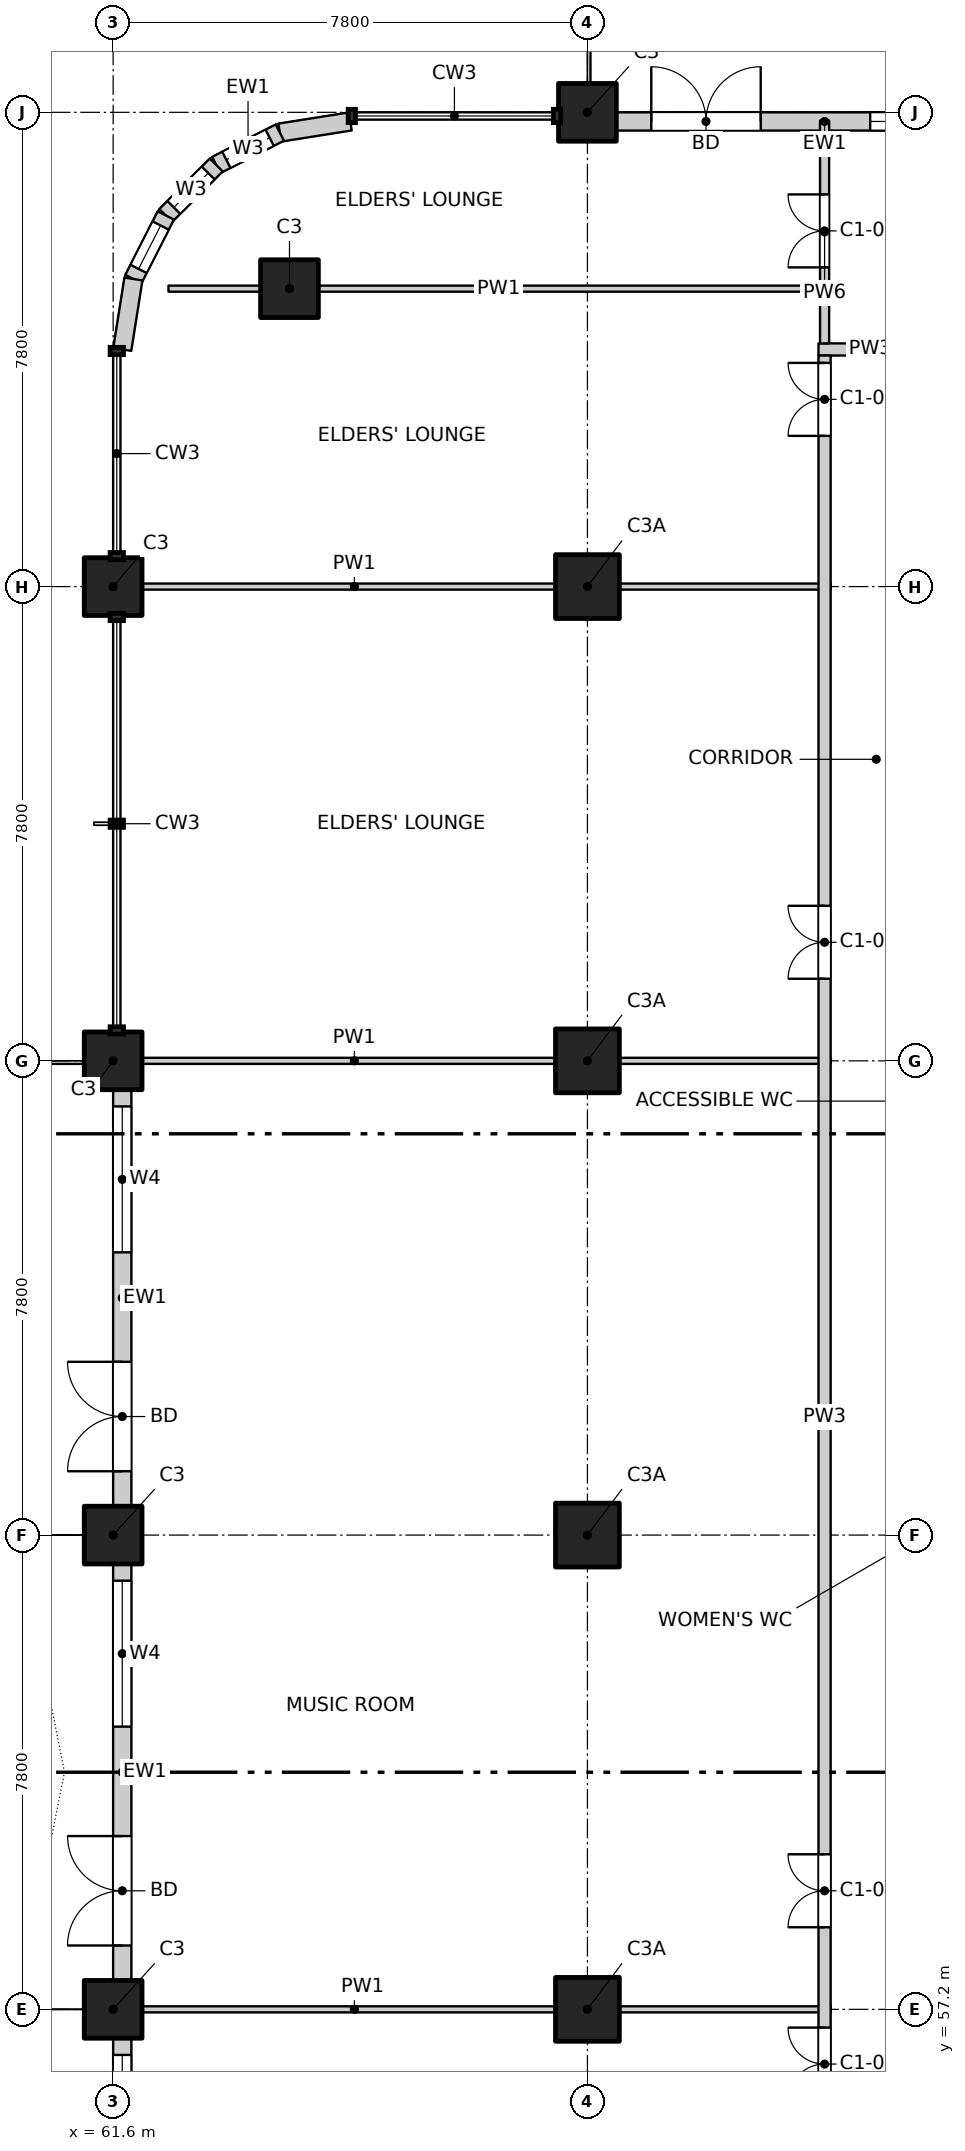
"""IFC4 building model, lengths in metres.
Left out: names, types, materials, properties, quantities, classifications, styles, units other than length and angle.
Written with IfcOpenShell. Run it as: python <this file> out.ifc"""

import sys

from ifc_helpers import new_model, si_unit, direction, frame, frame_2d, origin, origin_2d, place, context, subcontext, project, spatial, rectangle, extrude, element, fill, save


model = new_model("IFC4")
c1 = context("Model", 3, precision=1e-05, world=origin(), true_north=direction((0.0, 1.0)))
c2 = subcontext(c1, "Body", "Model", "MODEL_VIEW")
j1 = project(units=[si_unit("LENGTHUNIT", "METRE"), si_unit("PLANEANGLEUNIT", "RADIAN")], contexts=[c1])
p1 = place(None, origin())
s1 = spatial("IfcSite", under=j1, at=p1, CompositionType="ELEMENT")
p2 = place(p1, origin())
s2 = spatial("IfcBuilding", under=s1, at=p2, CompositionType="ELEMENT")
p3 = place(p2, frame((0.0, 0.0, 71.6)))
s3 = spatial("IfcBuildingStorey", under=s2, at=p3, CompositionType="ELEMENT", Elevation=71.6)
for number, where, z_axis, x_axis in (
    (1, (64.5, 85.5, -0.25), (0.0, 0.0, 1.0), (1.0, 0.0, 0.0)),
    (2, (69.4, 88.4, -0.25), (0.0, 0.0, 1.0), (1.0, 0.0, 0.0)),
    (3, (61.6, 57.2, -0.25), (0.0, 0.0, 1.0), (1.0, 0.0, 0.0)),
    (4, (61.6, 65.0, -0.25), (0.0, 0.0, 1.0), (1.0, 0.0, 0.0)),
    (5, (61.6, 72.8, -0.25), (0.0, 0.0, 1.0), (1.0, 0.0, 0.0)),
    (6, (61.6, 80.6, -0.25), (0.0, 0.0, 1.0), (1.0, 0.0, 0.0)),
):
    element("IfcColumn", number, at=place(p3, frame(where, z_axis=z_axis, x_axis=x_axis)), inside=s3, PredefinedType="COLUMN", context=c2, shape_type="SweptSolid", body=[
        extrude(rectangle(XDim=0.95, YDim=0.95, at=origin_2d()), origin(), (0.0, 0.0, 1.0), 3.4),
    ])
for number, where, z_axis, x_axis in (
    (7, (69.4, 57.2, -0.25), (0.0, 0.0, 1.0), (1.0, 0.0, 0.0)),
    (8, (69.4, 65.0, -0.25), (0.0, 0.0, 1.0), (1.0, 0.0, 0.0)),
    (9, (69.4, 72.8, -0.25), (0.0, 0.0, 1.0), (1.0, 0.0, 0.0)),
    (10, (69.4, 80.6, -0.25), (0.0, 0.0, 1.0), (1.0, 0.0, 0.0)),
):
    element("IfcColumn", number, at=place(p3, frame(where, z_axis=z_axis, x_axis=x_axis)), inside=s3, PredefinedType="COLUMN", context=c2, shape_type="SweptSolid", body=[
        extrude(rectangle(XDim=1.05, YDim=1.05, at=origin_2d()), origin(), (0.0, 0.0, 1.0), 3.4),
    ])
p4 = place(p3, frame((69.875, 88.25, 0.0), z_axis=(0.0, 0.0, 1.0), x_axis=(1.0, 0.0, 0.0)))
e11 = element("IfcWall", 11, at=p4, inside=s3, PredefinedType="SOLIDWALL", context=c2, shape_type="SweptSolid", body=[
    extrude(rectangle(XDim=6.85, YDim=0.3, at=frame_2d((3.425, 0.0))), origin(), (0.0, 0.0, 1.0), 2.7),
])
p5 = place(p4, frame((0.575, 0.0, 0.0)))
e12 = element("IfcOpeningElement", 12, at=p5, cuts=e11, PredefinedType="OPENING", context=c2, shape_type="SweptSolid", body=[
    extrude(rectangle(XDim=1.8, YDim=2.4, at=frame_2d((0.9, 1.2))), frame((0.0, 0.16, 0.0), z_axis=(0.0, -1.0, 0.0), x_axis=(1.0, 0.0, 0.0)), (0.0, 0.0, 1.0), 0.32),
])
p6 = place(p4, frame((4.175, 0.0, 0.6)))
e13 = element("IfcOpeningElement", 13, at=p6, cuts=e11, PredefinedType="OPENING", context=c2, shape_type="SweptSolid", body=[
    extrude(rectangle(XDim=2.4, YDim=2.1, at=frame_2d((1.2, 1.05))), frame((0.0, 0.16, 0.0), z_axis=(0.0, -1.0, 0.0), x_axis=(1.0, 0.0, 0.0)), (0.0, 0.0, 1.0), 0.32),
])
p7 = place(p3, frame((61.75, 49.875, 0.0), z_axis=(0.0, 0.0, 1.0), x_axis=(0.0, 1.0, 0.0)))
e14 = element("IfcWall", 14, at=p7, inside=s3, PredefinedType="SOLIDWALL", context=c2, shape_type="SweptSolid", body=[
    extrude(rectangle(XDim=6.85, YDim=0.3, at=frame_2d((3.425, 0.0))), origin(), (0.0, 0.0, 1.0), 2.7),
])
p8 = place(p7, frame((0.575, 0.0, 0.0)))
e15 = element("IfcOpeningElement", 15, at=p8, cuts=e14, PredefinedType="OPENING", context=c2, shape_type="SweptSolid", body=[
    extrude(rectangle(XDim=1.8, YDim=2.4, at=frame_2d((0.9, 1.2))), frame((0.0, 0.16, 0.0), z_axis=(0.0, -1.0, 0.0), x_axis=(1.0, 0.0, 0.0)), (0.0, 0.0, 1.0), 0.32),
])
p9 = place(p7, frame((4.175, 0.0, 0.6)))
e16 = element("IfcOpeningElement", 16, at=p9, cuts=e14, PredefinedType="OPENING", context=c2, shape_type="SweptSolid", body=[
    extrude(rectangle(XDim=2.4, YDim=2.1, at=frame_2d((1.2, 1.05))), frame((0.0, 0.16, 0.0), z_axis=(0.0, -1.0, 0.0), x_axis=(1.0, 0.0, 0.0)), (0.0, 0.0, 1.0), 0.32),
])
p10 = place(p3, frame((61.75, 57.675, 0.0), z_axis=(0.0, 0.0, 1.0), x_axis=(0.0, 1.0, 0.0)))
e17 = element("IfcWall", 17, at=p10, inside=s3, PredefinedType="SOLIDWALL", context=c2, shape_type="SweptSolid", body=[
    extrude(rectangle(XDim=6.85, YDim=0.3, at=frame_2d((3.425, 0.0))), origin(), (0.0, 0.0, 1.0), 2.7),
])
p11 = place(p10, frame((0.575, 0.0, 0.0)))
e18 = element("IfcOpeningElement", 18, at=p11, cuts=e17, PredefinedType="OPENING", context=c2, shape_type="SweptSolid", body=[
    extrude(rectangle(XDim=1.8, YDim=2.4, at=frame_2d((0.9, 1.2))), frame((0.0, 0.16, 0.0), z_axis=(0.0, -1.0, 0.0), x_axis=(1.0, 0.0, 0.0)), (0.0, 0.0, 1.0), 0.32),
])
p12 = place(p10, frame((4.175, 0.0, 0.6)))
e19 = element("IfcOpeningElement", 19, at=p12, cuts=e17, PredefinedType="OPENING", context=c2, shape_type="SweptSolid", body=[
    extrude(rectangle(XDim=2.4, YDim=2.1, at=frame_2d((1.2, 1.05))), frame((0.0, 0.16, 0.0), z_axis=(0.0, -1.0, 0.0), x_axis=(1.0, 0.0, 0.0)), (0.0, 0.0, 1.0), 0.32),
])
p13 = place(p3, frame((61.75, 65.475, 0.0), z_axis=(0.0, 0.0, 1.0), x_axis=(0.0, 1.0, 0.0)))
e20 = element("IfcWall", 20, at=p13, inside=s3, PredefinedType="SOLIDWALL", context=c2, shape_type="SweptSolid", body=[
    extrude(rectangle(XDim=6.85, YDim=0.3, at=frame_2d((3.425, 0.0))), origin(), (0.0, 0.0, 1.0), 2.7),
])
p14 = place(p13, frame((0.575, 0.0, 0.0)))
e21 = element("IfcOpeningElement", 21, at=p14, cuts=e20, PredefinedType="OPENING", context=c2, shape_type="SweptSolid", body=[
    extrude(rectangle(XDim=1.8, YDim=2.4, at=frame_2d((0.9, 1.2))), frame((0.0, 0.16, 0.0), z_axis=(0.0, -1.0, 0.0), x_axis=(1.0, 0.0, 0.0)), (0.0, 0.0, 1.0), 0.32),
])
p15 = place(p13, frame((4.175, 0.0, 0.6)))
e22 = element("IfcOpeningElement", 22, at=p15, cuts=e20, PredefinedType="OPENING", context=c2, shape_type="SweptSolid", body=[
    extrude(rectangle(XDim=2.4, YDim=2.1, at=frame_2d((1.2, 1.05))), frame((0.0, 0.16, 0.0), z_axis=(0.0, -1.0, 0.0), x_axis=(1.0, 0.0, 0.0)), (0.0, 0.0, 1.0), 0.32),
])
p16 = place(p3, frame((65.5, 88.25, 0.0), z_axis=(0.0, 0.0, 1.0), x_axis=(-0.987678452879, -0.156496880861, 0.0)))
e23 = element("IfcWall", 23, at=p16, inside=s3, PredefinedType="SOLIDWALL", context=c2, shape_type="SweptSolid", body=[
    extrude(rectangle(XDim=1.173, YDim=0.3, at=frame_2d((0.586, 0.0))), origin(), (0.0, 0.0, 1.0), 2.7),
])
p17 = place(p3, frame((64.341, 88.066, 0.0), z_axis=(0.0, 0.0, 1.0), x_axis=(-0.890988677504, -0.454025524128, 0.0)))
e24 = element("IfcWall", 24, at=p17, inside=s3, PredefinedType="SOLIDWALL", context=c2, shape_type="SweptSolid", body=[
    extrude(rectangle(XDim=1.173, YDim=0.3, at=frame_2d((0.587, 0.0))), origin(), (0.0, 0.0, 1.0), 2.7),
])
p18 = place(p17, frame((0.187, 0.0, 0.9)))
e25 = element("IfcOpeningElement", 25, at=p18, cuts=e24, PredefinedType="OPENING", context=c2, shape_type="SweptSolid", body=[
    extrude(rectangle(XDim=0.8, YDim=1.2, at=frame_2d((0.4, 0.6))), frame((0.0, 0.16, 0.0), z_axis=(0.0, -1.0, 0.0), x_axis=(1.0, 0.0, 0.0)), (0.0, 0.0, 1.0), 0.32),
])
p19 = place(p3, frame((63.296, 87.534, 0.0), z_axis=(0.0, 0.0, 1.0), x_axis=(-0.707106781187, -0.707106781187, 0.0)))
e26 = element("IfcWall", 26, at=p19, inside=s3, PredefinedType="SOLIDWALL", context=c2, shape_type="SweptSolid", body=[
    extrude(rectangle(XDim=1.173, YDim=0.3, at=frame_2d((0.586, 0.0))), origin(), (0.0, 0.0, 1.0), 2.7),
])
p20 = place(p19, frame((0.187, 0.0, 0.9)))
e27 = element("IfcOpeningElement", 27, at=p20, cuts=e26, PredefinedType="OPENING", context=c2, shape_type="SweptSolid", body=[
    extrude(rectangle(XDim=0.8, YDim=1.2, at=frame_2d((0.4, 0.6))), frame((0.0, 0.16, 0.0), z_axis=(0.0, -1.0, 0.0), x_axis=(1.0, 0.0, 0.0)), (0.0, 0.0, 1.0), 0.32),
])
p21 = place(p3, frame((62.466, 86.704, 0.0), z_axis=(0.0, 0.0, 1.0), x_axis=(-0.454025524128, -0.890988677504, 0.0)))
e28 = element("IfcWall", 28, at=p21, inside=s3, PredefinedType="SOLIDWALL", context=c2, shape_type="SweptSolid", body=[
    extrude(rectangle(XDim=1.173, YDim=0.3, at=frame_2d((0.587, 0.0))), origin(), (0.0, 0.0, 1.0), 2.7),
])
p22 = place(p21, frame((0.187, 0.0, 0.9)))
e29 = element("IfcOpeningElement", 29, at=p22, cuts=e28, PredefinedType="OPENING", context=c2, shape_type="SweptSolid", body=[
    extrude(rectangle(XDim=0.8, YDim=1.2, at=frame_2d((0.4, 0.6))), frame((0.0, 0.16, 0.0), z_axis=(0.0, -1.0, 0.0), x_axis=(1.0, 0.0, 0.0)), (0.0, 0.0, 1.0), 0.32),
])
p23 = place(p3, frame((61.934, 85.659, 0.0), z_axis=(0.0, 0.0, 1.0), x_axis=(-0.156496880861, -0.987678452879, 0.0)))
e30 = element("IfcWall", 30, at=p23, inside=s3, PredefinedType="SOLIDWALL", context=c2, shape_type="SweptSolid", body=[
    extrude(rectangle(XDim=1.173, YDim=0.3, at=frame_2d((0.586, 0.0))), origin(), (0.0, 0.0, 1.0), 2.7),
])
p24 = place(p3, frame((61.735, 57.2, 0.0), z_axis=(0.0, 0.0, 1.0), x_axis=(1.0, 0.0, 0.0)))
e31 = element("IfcWall", 31, at=p24, inside=s3, PredefinedType="PARTITIONING", context=c2, shape_type="SweptSolid", body=[
    extrude(rectangle(XDim=7.665, YDim=0.1, at=frame_2d((3.833, 0.0))), origin(), (0.0, 0.0, 1.0), 2.55),
])
p25 = place(p3, frame((69.4, 57.2, 0.0), z_axis=(0.0, 0.0, 1.0), x_axis=(1.0, 0.0, 0.0)))
e32 = element("IfcWall", 32, at=p25, inside=s3, PredefinedType="PARTITIONING", context=c2, shape_type="SweptSolid", body=[
    extrude(rectangle(XDim=4.0, YDim=0.1, at=frame_2d((2.0, 0.0))), origin(), (0.0, 0.0, 1.0), 3.15),
])
p26 = place(p3, frame((61.735, 72.8, 0.0), z_axis=(0.0, 0.0, 1.0), x_axis=(1.0, 0.0, 0.0)))
e33 = element("IfcWall", 33, at=p26, inside=s3, PredefinedType="PARTITIONING", context=c2, shape_type="SweptSolid", body=[
    extrude(rectangle(XDim=7.665, YDim=0.1, at=frame_2d((3.833, 0.0))), origin(), (0.0, 0.0, 1.0), 2.55),
])
p27 = place(p3, frame((69.4, 72.8, 0.0), z_axis=(0.0, 0.0, 1.0), x_axis=(1.0, 0.0, 0.0)))
e34 = element("IfcWall", 34, at=p27, inside=s3, PredefinedType="PARTITIONING", context=c2, shape_type="SweptSolid", body=[
    extrude(rectangle(XDim=4.0, YDim=0.1, at=frame_2d((2.0, 0.0))), origin(), (0.0, 0.0, 1.0), 3.15),
])
p28 = place(p3, frame((61.735, 80.6, 0.0), z_axis=(0.0, 0.0, 1.0), x_axis=(1.0, 0.0, 0.0)))
e35 = element("IfcWall", 35, at=p28, inside=s3, PredefinedType="PARTITIONING", context=c2, shape_type="SweptSolid", body=[
    extrude(rectangle(XDim=7.665, YDim=0.1, at=frame_2d((3.833, 0.0))), origin(), (0.0, 0.0, 1.0), 2.55),
])
p29 = place(p3, frame((69.4, 80.6, 0.0), z_axis=(0.0, 0.0, 1.0), x_axis=(1.0, 0.0, 0.0)))
e36 = element("IfcWall", 36, at=p29, inside=s3, PredefinedType="PARTITIONING", context=c2, shape_type="SweptSolid", body=[
    extrude(rectangle(XDim=4.0, YDim=0.1, at=frame_2d((2.0, 0.0))), origin(), (0.0, 0.0, 1.0), 3.15),
])
p30 = place(p3, frame((73.2, 84.5, 0.0), z_axis=(0.0, 0.0, 1.0), x_axis=(1.0, 0.0, 0.0)))
e37 = element("IfcWall", 37, at=p30, inside=s3, PredefinedType="PARTITIONING", context=c2, shape_type="SweptSolid", body=[
    extrude(rectangle(XDim=1.7, YDim=0.2, at=frame_2d((0.85, 0.0))), origin(), (0.0, 0.0, 1.0), 3.15),
])
p31 = place(p3, frame((62.51, 85.5, 0.0), z_axis=(0.0, 0.0, 1.0), x_axis=(1.0, 0.0, 0.0)))
e38 = element("IfcWall", 38, at=p31, inside=s3, PredefinedType="PARTITIONING", context=c2, shape_type="SweptSolid", body=[
    extrude(rectangle(XDim=10.865, YDim=0.1, at=frame_2d((5.433, 0.0))), origin(), (0.0, 0.0, 1.0), 3.15),
])
p32 = place(p3, frame((73.3, 49.5, 0.0), z_axis=(0.0, 0.0, 1.0), x_axis=(0.0, 1.0, 0.0)))
e39 = element("IfcWall", 39, at=p32, inside=s3, PredefinedType="PARTITIONING", context=c2, shape_type="SweptSolid", body=[
    extrude(rectangle(XDim=34.9, YDim=0.2, at=frame_2d((17.45, 0.0))), origin(), (0.0, 0.0, 1.0), 3.15),
])
p33 = place(p32, frame((6.2, 0.0, 0.0)))
e40 = element("IfcOpeningElement", 40, at=p33, cuts=e39, PredefinedType="OPENING", context=c2, shape_type="SweptSolid", body=[
    extrude(rectangle(XDim=1.2, YDim=2.1, at=frame_2d((0.6, 1.05))), frame((0.0, 0.11, 0.0), z_axis=(0.0, -1.0, 0.0), x_axis=(1.0, 0.0, 0.0)), (0.0, 0.0, 1.0), 0.22),
])
p34 = place(p32, frame((9.05, 0.0, 0.0)))
e41 = element("IfcOpeningElement", 41, at=p34, cuts=e39, PredefinedType="OPENING", context=c2, shape_type="SweptSolid", body=[
    extrude(rectangle(XDim=1.2, YDim=2.1, at=frame_2d((0.6, 1.05))), frame((0.0, 0.11, 0.0), z_axis=(0.0, -1.0, 0.0), x_axis=(1.0, 0.0, 0.0)), (0.0, 0.0, 1.0), 0.22),
])
p35 = place(p32, frame((24.65, 0.0, 0.0)))
e42 = element("IfcOpeningElement", 42, at=p35, cuts=e39, PredefinedType="OPENING", context=c2, shape_type="SweptSolid", body=[
    extrude(rectangle(XDim=1.2, YDim=2.1, at=frame_2d((0.6, 1.05))), frame((0.0, 0.11, 0.0), z_axis=(0.0, -1.0, 0.0), x_axis=(1.0, 0.0, 0.0)), (0.0, 0.0, 1.0), 0.22),
])
p36 = place(p32, frame((33.579, 0.0, 0.0)))
e43 = element("IfcOpeningElement", 43, at=p36, cuts=e39, PredefinedType="OPENING", context=c2, shape_type="SweptSolid", body=[
    extrude(rectangle(XDim=1.2, YDim=2.1, at=frame_2d((0.6, 1.05))), frame((0.0, 0.11, 0.0), z_axis=(0.0, -1.0, 0.0), x_axis=(1.0, 0.0, 0.0)), (0.0, 0.0, 1.0), 0.22),
])
p37 = place(p3, frame((73.3, 84.6, 0.0), z_axis=(0.0, 0.0, 1.0), x_axis=(0.0, 1.0, 0.0)))
e44 = element("IfcWall", 44, at=p37, inside=s3, PredefinedType="PARTITIONING", context=c2, shape_type="SweptSolid", body=[
    extrude(rectangle(XDim=3.665, YDim=0.15, at=frame_2d((1.833, 0.0))), origin(), (0.0, 0.0, 1.0), 3.15),
])
p38 = place(p37, frame((1.25, 0.0, 0.0)))
e45 = element("IfcOpeningElement", 45, at=p38, cuts=e44, PredefinedType="OPENING", context=c2, shape_type="SweptSolid", body=[
    extrude(rectangle(XDim=1.2, YDim=2.1, at=frame_2d((0.6, 1.05))), frame((0.0, 0.085, 0.0), z_axis=(0.0, -1.0, 0.0), x_axis=(1.0, 0.0, 0.0)), (0.0, 0.0, 1.0), 0.17),
])
p39 = place(p5, origin())
e46 = element("IfcDoor", 46, at=p39, inside=s3, OperationType="DOUBLE_DOOR_SINGLE_SWING", PredefinedType="DOOR", context=c2, shape_type="SweptSolid", body=[
    extrude(rectangle(XDim=1.8, YDim=2.4, at=frame_2d((0.9, 1.2))), frame((0.0, 0.025, 0.0), z_axis=(0.0, -1.0, 0.0), x_axis=(1.0, 0.0, 0.0)), (0.0, 0.0, 1.0), 0.05),
])
fill(e12, e46)
p40 = place(p6, origin())
e47 = element("IfcWindow", 47, at=p40, inside=s3, PartitioningType="SINGLE_PANEL", PredefinedType="WINDOW", context=c2, shape_type="SweptSolid", body=[
    extrude(rectangle(XDim=2.4, YDim=2.1, at=frame_2d((1.2, 1.05))), frame((0.0, 0.03, 0.0), z_axis=(0.0, -1.0, 0.0), x_axis=(1.0, 0.0, 0.0)), (0.0, 0.0, 1.0), 0.06),
])
fill(e13, e47)
p41 = place(p9, origin())
e48 = element("IfcWindow", 48, at=p41, inside=s3, PartitioningType="SINGLE_PANEL", PredefinedType="WINDOW", context=c2, shape_type="SweptSolid", body=[
    extrude(rectangle(XDim=2.4, YDim=2.1, at=frame_2d((1.2, 1.05))), frame((0.0, 0.03, 0.0), z_axis=(0.0, -1.0, 0.0), x_axis=(1.0, 0.0, 0.0)), (0.0, 0.0, 1.0), 0.06),
])
fill(e16, e48)
p42 = place(p11, origin())
e49 = element("IfcDoor", 49, at=p42, inside=s3, OperationType="DOUBLE_DOOR_SINGLE_SWING", PredefinedType="DOOR", context=c2, shape_type="SweptSolid", body=[
    extrude(rectangle(XDim=1.8, YDim=2.4, at=frame_2d((0.9, 1.2))), frame((0.0, 0.025, 0.0), z_axis=(0.0, -1.0, 0.0), x_axis=(1.0, 0.0, 0.0)), (0.0, 0.0, 1.0), 0.05),
])
fill(e18, e49)
p43 = place(p12, origin())
e50 = element("IfcWindow", 50, at=p43, inside=s3, PartitioningType="SINGLE_PANEL", PredefinedType="WINDOW", context=c2, shape_type="SweptSolid", body=[
    extrude(rectangle(XDim=2.4, YDim=2.1, at=frame_2d((1.2, 1.05))), frame((0.0, 0.03, 0.0), z_axis=(0.0, -1.0, 0.0), x_axis=(1.0, 0.0, 0.0)), (0.0, 0.0, 1.0), 0.06),
])
fill(e19, e50)
p44 = place(p14, origin())
e51 = element("IfcDoor", 51, at=p44, inside=s3, OperationType="DOUBLE_DOOR_SINGLE_SWING", PredefinedType="DOOR", context=c2, shape_type="SweptSolid", body=[
    extrude(rectangle(XDim=1.8, YDim=2.4, at=frame_2d((0.9, 1.2))), frame((0.0, 0.025, 0.0), z_axis=(0.0, -1.0, 0.0), x_axis=(1.0, 0.0, 0.0)), (0.0, 0.0, 1.0), 0.05),
])
fill(e21, e51)
p45 = place(p15, origin())
e52 = element("IfcWindow", 52, at=p45, inside=s3, PartitioningType="SINGLE_PANEL", PredefinedType="WINDOW", context=c2, shape_type="SweptSolid", body=[
    extrude(rectangle(XDim=2.4, YDim=2.1, at=frame_2d((1.2, 1.05))), frame((0.0, 0.03, 0.0), z_axis=(0.0, -1.0, 0.0), x_axis=(1.0, 0.0, 0.0)), (0.0, 0.0, 1.0), 0.06),
])
fill(e22, e52)
p46 = place(p18, origin())
e53 = element("IfcWindow", 53, at=p46, inside=s3, PartitioningType="SINGLE_PANEL", PredefinedType="WINDOW", context=c2, shape_type="SweptSolid", body=[
    extrude(rectangle(XDim=0.8, YDim=1.2, at=frame_2d((0.4, 0.6))), frame((0.0, 0.03, 0.0), z_axis=(0.0, -1.0, 0.0), x_axis=(1.0, 0.0, 0.0)), (0.0, 0.0, 1.0), 0.06),
])
fill(e25, e53)
p47 = place(p20, origin())
e54 = element("IfcWindow", 54, at=p47, inside=s3, PartitioningType="SINGLE_PANEL", PredefinedType="WINDOW", context=c2, shape_type="SweptSolid", body=[
    extrude(rectangle(XDim=0.8, YDim=1.2, at=frame_2d((0.4, 0.6))), frame((0.0, 0.03, 0.0), z_axis=(0.0, -1.0, 0.0), x_axis=(1.0, 0.0, 0.0)), (0.0, 0.0, 1.0), 0.06),
])
fill(e27, e54)
p48 = place(p22, origin())
e55 = element("IfcWindow", 55, at=p48, inside=s3, PartitioningType="SINGLE_PANEL", PredefinedType="WINDOW", context=c2, shape_type="SweptSolid", body=[
    extrude(rectangle(XDim=0.8, YDim=1.2, at=frame_2d((0.4, 0.6))), frame((0.0, 0.03, 0.0), z_axis=(0.0, -1.0, 0.0), x_axis=(1.0, 0.0, 0.0)), (0.0, 0.0, 1.0), 0.06),
])
fill(e29, e55)
p49 = place(p33, origin())
e56 = element("IfcDoor", 56, at=p49, inside=s3, OperationType="DOUBLE_DOOR_SINGLE_SWING", PredefinedType="DOOR", context=c2, shape_type="SweptSolid", body=[
    extrude(rectangle(XDim=1.2, YDim=2.1, at=frame_2d((0.6, 1.05))), frame((0.0, 0.025, 0.0), z_axis=(0.0, -1.0, 0.0), x_axis=(1.0, 0.0, 0.0)), (0.0, 0.0, 1.0), 0.05),
])
fill(e40, e56)
p50 = place(p34, origin())
e57 = element("IfcDoor", 57, at=p50, inside=s3, OperationType="DOUBLE_DOOR_SINGLE_SWING", PredefinedType="DOOR", context=c2, shape_type="SweptSolid", body=[
    extrude(rectangle(XDim=1.2, YDim=2.1, at=frame_2d((0.6, 1.05))), frame((0.0, 0.025, 0.0), z_axis=(0.0, -1.0, 0.0), x_axis=(1.0, 0.0, 0.0)), (0.0, 0.0, 1.0), 0.05),
])
fill(e41, e57)
p51 = place(p35, origin())
e58 = element("IfcDoor", 58, at=p51, inside=s3, OperationType="DOUBLE_DOOR_SINGLE_SWING", PredefinedType="DOOR", context=c2, shape_type="SweptSolid", body=[
    extrude(rectangle(XDim=1.2, YDim=2.1, at=frame_2d((0.6, 1.05))), frame((0.0, 0.025, 0.0), z_axis=(0.0, -1.0, 0.0), x_axis=(1.0, 0.0, 0.0)), (0.0, 0.0, 1.0), 0.05),
])
fill(e42, e58)
p52 = place(p36, origin())
e59 = element("IfcDoor", 59, at=p52, inside=s3, OperationType="DOUBLE_DOOR_SINGLE_SWING", PredefinedType="DOOR", context=c2, shape_type="SweptSolid", body=[
    extrude(rectangle(XDim=1.2, YDim=2.1, at=frame_2d((0.6, 1.05))), frame((0.0, 0.025, 0.0), z_axis=(0.0, -1.0, 0.0), x_axis=(1.0, 0.0, 0.0)), (0.0, 0.0, 1.0), 0.05),
])
fill(e43, e59)
p53 = place(p38, origin())
e60 = element("IfcDoor", 60, at=p53, inside=s3, OperationType="DOUBLE_DOOR_SINGLE_SWING", PredefinedType="DOOR", context=c2, shape_type="SweptSolid", body=[
    extrude(rectangle(XDim=1.2, YDim=2.1, at=frame_2d((0.6, 1.05))), frame((0.0, 0.025, 0.0), z_axis=(0.0, -1.0, 0.0), x_axis=(1.0, 0.0, 0.0)), (0.0, 0.0, 1.0), 0.05),
])
fill(e45, e60)
save(model, sys.argv[1])
